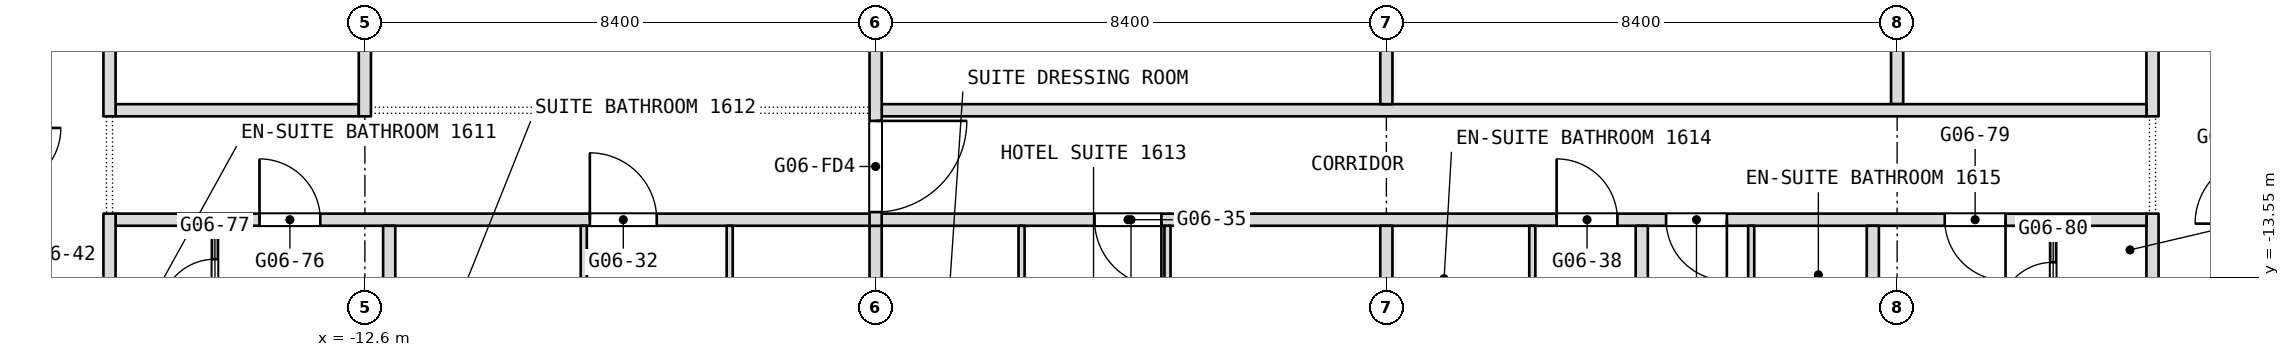
"""IFC4 building model, lengths in metres.
Left out: names, types, materials, properties, quantities, classifications, styles, units other than length and angle.
Written with IfcOpenShell. Run it as: python <this file> out.ifc"""

import sys

from ifc_helpers import new_model, si_unit, direction, frame, frame_2d, origin, place, context, subcontext, project, spatial, rectangle, extrude, element, fill, save


model = new_model("IFC4")
c1 = context("Model", 3, precision=1e-05, world=origin(), true_north=direction((0.0, 1.0)))
c2 = subcontext(c1, "Body", "Model", "MODEL_VIEW")
j1 = project(units=[si_unit("LENGTHUNIT", "METRE"), si_unit("PLANEANGLEUNIT", "RADIAN")], contexts=[c1])
p1 = place(None, origin())
s1 = spatial("IfcSite", under=j1, at=p1, CompositionType="ELEMENT")
p2 = place(p1, origin())
s2 = spatial("IfcBuilding", under=s1, at=p2, CompositionType="ELEMENT")
p3 = place(p2, frame((0.0, 0.0, 72.5)))
s3 = spatial("IfcBuildingStorey", under=s2, at=p3, CompositionType="ELEMENT", Elevation=72.5)
p4 = place(p3, frame((16.8, -17.143, 0.0), z_axis=(0.0, 0.0, 1.0), x_axis=(0.0, 1.0, 0.0)))
e1 = element("IfcWall", 1, at=p4, inside=s3, PredefinedType="PARTITIONING", context=c2, shape_type="SweptSolid", body=[
    extrude(rectangle(XDim=4.643, YDim=0.2, at=frame_2d((2.322, 0.0))), origin(), (0.0, 0.0, 1.0), 3.34),
])
p5 = place(p4, frame((0.772, 0.0, 0.0)))
e2 = element("IfcOpeningElement", 2, at=p5, cuts=e1, PredefinedType="OPENING", context=c2, shape_type="SweptSolid", body=[
    extrude(rectangle(XDim=0.9, YDim=2.1, at=frame_2d((0.45, 1.05))), frame((0.0, 0.1, 0.0), z_axis=(0.0, -1.0, 0.0), x_axis=(1.0, 0.0, 0.0)), (0.0, 0.0, 1.0), 0.2),
])
p6 = place(p3, frame((16.8, -10.9, 0.0), z_axis=(0.0, 0.0, 1.0), x_axis=(0.0, 1.0, 0.0)))
e3 = element("IfcWall", 3, at=p6, inside=s3, PredefinedType="PARTITIONING", context=c2, shape_type="SweptSolid", body=[
    extrude(rectangle(XDim=7.3, YDim=0.2, at=frame_2d((3.65, 0.0))), origin(), (0.0, 0.0, 1.0), 3.34),
])
p7 = place(p6, frame((3.15, 0.0, 0.0)))
e4 = element("IfcOpeningElement", 4, at=p7, cuts=e3, PredefinedType="OPENING", context=c2, shape_type="SweptSolid", body=[
    extrude(rectangle(XDim=1.0, YDim=2.1, at=frame_2d((0.5, 1.05))), frame((0.0, 0.1, 0.0), z_axis=(0.0, -1.0, 0.0), x_axis=(1.0, 0.0, 0.0)), (0.0, 0.0, 1.0), 0.2),
])
p8 = place(p3, frame((15.166, -15.0, 0.0), z_axis=(0.0, 0.0, 1.0), x_axis=(0.0, 1.0, 0.0)))
e5 = element("IfcWall", 5, at=p8, inside=s3, PredefinedType="PARTITIONING", context=c2, shape_type="SweptSolid", body=[
    extrude(rectangle(XDim=2.3, YDim=0.1, at=frame_2d((1.15, 0.0))), origin(), (0.0, 0.0, 1.0), 3.34),
])
p9 = place(p8, frame((0.8, 0.0, 0.0)))
e6 = element("IfcOpeningElement", 6, at=p9, cuts=e5, PredefinedType="OPENING", context=c2, shape_type="SweptSolid", body=[
    extrude(rectangle(XDim=0.9, YDim=2.1, at=frame_2d((0.45, 1.05))), frame((0.0, 0.05, 0.0), z_axis=(0.0, -1.0, 0.0), x_axis=(1.0, 0.0, 0.0)), (0.0, 0.0, 1.0), 0.1),
])
p10 = place(p3, frame((12.6, -10.7, 0.0), z_axis=(0.0, 0.0, 1.0), x_axis=(0.0, 1.0, 0.0)))
e7 = element("IfcWall", 7, at=p10, inside=s3, PredefinedType="PARTITIONING", context=c2, shape_type="SweptSolid", body=[
    extrude(rectangle(XDim=3.6, YDim=0.2, at=frame_2d((1.8, 0.0))), origin(), (0.0, 0.0, 1.0), 3.34),
])
p11 = place(p3, frame((-16.7, -12.6, 0.0), z_axis=(0.0, 0.0, 1.0), x_axis=(1.0, 0.0, 0.0)))
e8 = element("IfcWall", 8, at=p11, inside=s3, PredefinedType="PARTITIONING", context=c2, shape_type="SweptSolid", body=[
    extrude(rectangle(XDim=33.4, YDim=0.2, at=frame_2d((16.7, 0.0))), origin(), (0.0, 0.0, 1.0), 3.34),
])
p12 = place(p11, frame((7.8, 0.0, 0.0)))
e9 = element("IfcOpeningElement", 9, at=p12, cuts=e8, PredefinedType="OPENING", context=c2, shape_type="SweptSolid", body=[
    extrude(rectangle(XDim=1.1, YDim=2.1, at=frame_2d((0.55, 1.05))), frame((0.0, 0.1, 0.0), z_axis=(0.0, -1.0, 0.0), x_axis=(1.0, 0.0, 0.0)), (0.0, 0.0, 1.0), 0.2),
])
p13 = place(p11, frame((16.1, 0.0, 0.0)))
e10 = element("IfcOpeningElement", 10, at=p13, cuts=e8, PredefinedType="OPENING", context=c2, shape_type="SweptSolid", body=[
    extrude(rectangle(XDim=1.1, YDim=2.1, at=frame_2d((0.55, 1.05))), frame((0.0, 0.1, 0.0), z_axis=(0.0, -1.0, 0.0), x_axis=(1.0, 0.0, 0.0)), (0.0, 0.0, 1.0), 0.2),
])
p14 = place(p11, frame((23.7, 0.0, 0.0)))
e11 = element("IfcOpeningElement", 11, at=p14, cuts=e8, PredefinedType="OPENING", context=c2, shape_type="SweptSolid", body=[
    extrude(rectangle(XDim=1.0, YDim=2.1, at=frame_2d((0.5, 1.05))), frame((0.0, 0.1, 0.0), z_axis=(0.0, -1.0, 0.0), x_axis=(1.0, 0.0, 0.0)), (0.0, 0.0, 1.0), 0.2),
])
p15 = place(p11, frame((25.5, 0.0, 0.0)))
e12 = element("IfcOpeningElement", 12, at=p15, cuts=e8, PredefinedType="OPENING", context=c2, shape_type="SweptSolid", body=[
    extrude(rectangle(XDim=1.0, YDim=2.1, at=frame_2d((0.5, 1.05))), frame((0.0, 0.1, 0.0), z_axis=(0.0, -1.0, 0.0), x_axis=(1.0, 0.0, 0.0)), (0.0, 0.0, 1.0), 0.2),
])
p16 = place(p11, frame((2.367, 0.0, 0.0)))
e13 = element("IfcOpeningElement", 13, at=p16, cuts=e8, PredefinedType="OPENING", context=c2, shape_type="SweptSolid", body=[
    extrude(rectangle(XDim=1.0, YDim=2.1, at=frame_2d((0.5, 1.05))), frame((0.0, 0.1, 0.0), z_axis=(0.0, -1.0, 0.0), x_axis=(1.0, 0.0, 0.0)), (0.0, 0.0, 1.0), 0.2),
])
p17 = place(p11, frame((30.083, 0.0, 0.0)))
e14 = element("IfcOpeningElement", 14, at=p17, cuts=e8, PredefinedType="OPENING", context=c2, shape_type="SweptSolid", body=[
    extrude(rectangle(XDim=1.0, YDim=2.1, at=frame_2d((0.5, 1.05))), frame((0.0, 0.1, 0.0), z_axis=(0.0, -1.0, 0.0), x_axis=(1.0, 0.0, 0.0)), (0.0, 0.0, 1.0), 0.2),
])
p18 = place(p3, frame((12.2, -15.325, 0.0), z_axis=(0.0, 0.0, 1.0), x_axis=(0.0, 1.0, 0.0)))
e15 = element("IfcWall", 15, at=p18, inside=s3, PredefinedType="PARTITIONING", context=c2, shape_type="SweptSolid", body=[
    extrude(rectangle(XDim=2.625, YDim=0.2, at=frame_2d((1.312, 0.0))), origin(), (0.0, 0.0, 1.0), 3.34),
])
p19 = place(p3, frame((-16.7, -10.8, 0.0), z_axis=(0.0, 0.0, 1.0), x_axis=(1.0, 0.0, 0.0)))
e16 = element("IfcWall", 16, at=p19, inside=s3, PredefinedType="PARTITIONING", context=c2, shape_type="SweptSolid", body=[
    extrude(rectangle(XDim=4.0, YDim=0.2, at=frame_2d((2.0, 0.0))), origin(), (0.0, 0.0, 1.0), 3.34),
])
p20 = place(p3, frame((-4.1, -10.8, 0.0), z_axis=(0.0, 0.0, 1.0), x_axis=(1.0, 0.0, 0.0)))
e17 = element("IfcWall", 17, at=p20, inside=s3, PredefinedType="PARTITIONING", context=c2, shape_type="SweptSolid", body=[
    extrude(rectangle(XDim=20.8, YDim=0.2, at=frame_2d((10.4, 0.0))), origin(), (0.0, 0.0, 1.0), 3.34),
])
p21 = place(p3, frame((10.2, -15.425, 0.0), z_axis=(0.0, 0.0, 1.0), x_axis=(0.0, 1.0, 0.0)))
e18 = element("IfcWall", 18, at=p21, inside=s3, PredefinedType="PARTITIONING", context=c2, shape_type="SweptSolid", body=[
    extrude(rectangle(XDim=2.725, YDim=0.1, at=frame_2d((1.363, 0.0))), origin(), (0.0, 0.0, 1.0), 3.34),
])
p22 = place(p3, frame((8.4, -17.7, 0.0), z_axis=(0.0, 0.0, 1.0), x_axis=(0.0, 1.0, 0.0)))
e19 = element("IfcWall", 19, at=p22, inside=s3, PredefinedType="PARTITIONING", context=c2, shape_type="SweptSolid", body=[
    extrude(rectangle(XDim=5.0, YDim=0.2, at=frame_2d((2.5, 0.0))), origin(), (0.0, 0.0, 1.0), 3.34),
])
p23 = place(p3, frame((6.6, -15.325, 0.0), z_axis=(0.0, 0.0, 1.0), x_axis=(0.0, 1.0, 0.0)))
e20 = element("IfcWall", 20, at=p23, inside=s3, PredefinedType="PARTITIONING", context=c2, shape_type="SweptSolid", body=[
    extrude(rectangle(XDim=2.625, YDim=0.1, at=frame_2d((1.312, 0.0))), origin(), (0.0, 0.0, 1.0), 3.34),
])
p24 = place(p3, frame((4.2, -17.7, 0.0), z_axis=(0.0, 0.0, 1.0), x_axis=(0.0, 1.0, 0.0)))
e21 = element("IfcWall", 21, at=p24, inside=s3, PredefinedType="PARTITIONING", context=c2, shape_type="SweptSolid", body=[
    extrude(rectangle(XDim=5.0, YDim=0.2, at=frame_2d((2.5, 0.0))), origin(), (0.0, 0.0, 1.0), 3.34),
])
p25 = place(p3, frame((4.2, -10.7, 0.0), z_axis=(0.0, 0.0, 1.0), x_axis=(0.0, 1.0, 0.0)))
e22 = element("IfcWall", 22, at=p25, inside=s3, PredefinedType="PARTITIONING", context=c2, shape_type="SweptSolid", body=[
    extrude(rectangle(XDim=8.8, YDim=0.2, at=frame_2d((4.4, 0.0))), origin(), (0.0, 0.0, 1.0), 3.34),
])
p26 = place(p3, frame((0.6, -16.25, 0.0), z_axis=(0.0, 0.0, 1.0), x_axis=(0.0, 1.0, 0.0)))
e23 = element("IfcWall", 23, at=p26, inside=s3, PredefinedType="PARTITIONING", context=c2, shape_type="SweptSolid", body=[
    extrude(rectangle(XDim=3.55, YDim=0.1, at=frame_2d((1.775, 0.0))), origin(), (0.0, 0.0, 1.0), 3.34),
])
p27 = place(p3, frame((-1.8, -16.15, 0.0), z_axis=(0.0, 0.0, 1.0), x_axis=(0.0, 1.0, 0.0)))
e24 = element("IfcWall", 24, at=p27, inside=s3, PredefinedType="PARTITIONING", context=c2, shape_type="SweptSolid", body=[
    extrude(rectangle(XDim=3.45, YDim=0.1, at=frame_2d((1.725, 0.0))), origin(), (0.0, 0.0, 1.0), 3.34),
])
p28 = place(p3, frame((-4.2, -17.7, 0.0), z_axis=(0.0, 0.0, 1.0), x_axis=(0.0, 1.0, 0.0)))
e25 = element("IfcWall", 25, at=p28, inside=s3, PredefinedType="PARTITIONING", context=c2, shape_type="SweptSolid", body=[
    extrude(rectangle(XDim=5.0, YDim=0.2, at=frame_2d((2.5, 0.0))), origin(), (0.0, 0.0, 1.0), 3.34),
])
p29 = place(p3, frame((-4.2, -12.7, 0.0), z_axis=(0.0, 0.0, 1.0), x_axis=(0.0, 1.0, 0.0)))
e26 = element("IfcWall", 26, at=p29, inside=s3, PredefinedType="PARTITIONING", context=c2, shape_type="SweptSolid", body=[
    extrude(rectangle(XDim=12.7, YDim=0.2, at=frame_2d((6.35, 0.0))), origin(), (0.0, 0.0, 1.0), 3.34),
])
p30 = place(p29, frame((11.05, 0.0, 0.0)))
e27 = element("IfcOpeningElement", 27, at=p30, cuts=e26, PredefinedType="OPENING", context=c2, shape_type="SweptSolid", body=[
    extrude(rectangle(XDim=1.5, YDim=2.1, at=frame_2d((0.75, 1.05))), frame((0.0, 0.1, 0.0), z_axis=(0.0, -1.0, 0.0), x_axis=(1.0, 0.0, 0.0)), (0.0, 0.0, 1.0), 0.2),
])
p31 = place(p29, frame((0.225, 0.0, 0.0)))
e28 = element("IfcOpeningElement", 28, at=p31, cuts=e26, PredefinedType="OPENING", context=c2, shape_type="SweptSolid", body=[
    extrude(rectangle(XDim=1.5, YDim=2.1, at=frame_2d((0.75, 1.05))), frame((0.0, 0.1, 0.0), z_axis=(0.0, -1.0, 0.0), x_axis=(1.0, 0.0, 0.0)), (0.0, 0.0, 1.0), 0.2),
])
p32 = place(p3, frame((-6.6, -16.25, 0.0), z_axis=(0.0, 0.0, 1.0), x_axis=(0.0, 1.0, 0.0)))
e29 = element("IfcWall", 29, at=p32, inside=s3, PredefinedType="PARTITIONING", context=c2, shape_type="SweptSolid", body=[
    extrude(rectangle(XDim=3.55, YDim=0.1, at=frame_2d((1.775, 0.0))), origin(), (0.0, 0.0, 1.0), 3.34),
])
p33 = place(p3, frame((-9.0, -16.15, 0.0), z_axis=(0.0, 0.0, 1.0), x_axis=(0.0, 1.0, 0.0)))
e30 = element("IfcWall", 30, at=p33, inside=s3, PredefinedType="PARTITIONING", context=c2, shape_type="SweptSolid", body=[
    extrude(rectangle(XDim=3.45, YDim=0.1, at=frame_2d((1.725, 0.0))), origin(), (0.0, 0.0, 1.0), 3.34),
])
p34 = place(p33, frame((0.94, 0.0, 0.0)))
e31 = element("IfcOpeningElement", 31, at=p34, cuts=e30, PredefinedType="OPENING", context=c2, shape_type="SweptSolid", body=[
    extrude(rectangle(XDim=0.9, YDim=2.1, at=frame_2d((0.45, 1.05))), frame((0.0, 0.05, 0.0), z_axis=(0.0, -1.0, 0.0), x_axis=(1.0, 0.0, 0.0)), (0.0, 0.0, 1.0), 0.1),
])
p35 = place(p3, frame((-12.2, -16.0, 0.0), z_axis=(0.0, 0.0, 1.0), x_axis=(0.0, 1.0, 0.0)))
e32 = element("IfcWall", 32, at=p35, inside=s3, PredefinedType="PARTITIONING", context=c2, shape_type="SweptSolid", body=[
    extrude(rectangle(XDim=3.3, YDim=0.2, at=frame_2d((1.65, 0.0))), origin(), (0.0, 0.0, 1.0), 3.34),
])
p36 = place(p3, frame((-12.6, -10.9, 0.0), z_axis=(0.0, 0.0, 1.0), x_axis=(0.0, 1.0, 0.0)))
e33 = element("IfcWall", 33, at=p36, inside=s3, PredefinedType="PARTITIONING", context=c2, shape_type="SweptSolid", body=[
    extrude(rectangle(XDim=5.6, YDim=0.2, at=frame_2d((2.8, 0.0))), origin(), (0.0, 0.0, 1.0), 3.34),
])
p37 = place(p3, frame((-15.066, -14.9, 0.0), z_axis=(0.0, 0.0, 1.0), x_axis=(0.0, 1.0, 0.0)))
e34 = element("IfcWall", 34, at=p37, inside=s3, PredefinedType="PARTITIONING", context=c2, shape_type="SweptSolid", body=[
    extrude(rectangle(XDim=2.2, YDim=0.1, at=frame_2d((1.1, 0.0))), origin(), (0.0, 0.0, 1.0), 3.34),
])
p38 = place(p37, frame((0.75, 0.0, 0.0)))
e35 = element("IfcOpeningElement", 35, at=p38, cuts=e34, PredefinedType="OPENING", context=c2, shape_type="SweptSolid", body=[
    extrude(rectangle(XDim=0.9, YDim=2.1, at=frame_2d((0.45, 1.05))), frame((0.0, 0.05, 0.0), z_axis=(0.0, -1.0, 0.0), x_axis=(1.0, 0.0, 0.0)), (0.0, 0.0, 1.0), 0.1),
])
p39 = place(p3, frame((-16.8, -17.143, 0.0), z_axis=(0.0, 0.0, 1.0), x_axis=(0.0, 1.0, 0.0)))
e36 = element("IfcWall", 36, at=p39, inside=s3, PredefinedType="PARTITIONING", context=c2, shape_type="SweptSolid", body=[
    extrude(rectangle(XDim=4.643, YDim=0.2, at=frame_2d((2.322, 0.0))), origin(), (0.0, 0.0, 1.0), 3.34),
])
p40 = place(p39, frame((0.772, 0.0, 0.0)))
e37 = element("IfcOpeningElement", 37, at=p40, cuts=e36, PredefinedType="OPENING", context=c2, shape_type="SweptSolid", body=[
    extrude(rectangle(XDim=0.9, YDim=2.1, at=frame_2d((0.45, 1.05))), frame((0.0, 0.1, 0.0), z_axis=(0.0, -1.0, 0.0), x_axis=(1.0, 0.0, 0.0)), (0.0, 0.0, 1.0), 0.2),
])
p41 = place(p3, frame((-16.8, -10.9, 0.0), z_axis=(0.0, 0.0, 1.0), x_axis=(0.0, 1.0, 0.0)))
e38 = element("IfcWall", 38, at=p41, inside=s3, PredefinedType="PARTITIONING", context=c2, shape_type="SweptSolid", body=[
    extrude(rectangle(XDim=9.0, YDim=0.2, at=frame_2d((4.5, 0.0))), origin(), (0.0, 0.0, 1.0), 3.34),
])
p42 = place(p9, origin())
e39 = element("IfcDoor", 39, at=p42, inside=s3, OperationType="SINGLE_SWING_RIGHT", PredefinedType="DOOR", context=c2, shape_type="SweptSolid", body=[
    extrude(rectangle(XDim=0.9, YDim=2.1, at=frame_2d((0.45, 1.05))), frame((0.0, 0.025, 0.0), z_axis=(0.0, -1.0, 0.0), x_axis=(1.0, 0.0, 0.0)), (0.0, 0.0, 1.0), 0.05),
])
fill(e6, e39)
p43 = place(p12, origin())
e40 = element("IfcDoor", 40, at=p43, inside=s3, OperationType="SINGLE_SWING_RIGHT", PredefinedType="DOOR", context=c2, shape_type="SweptSolid", body=[
    extrude(rectangle(XDim=1.1, YDim=2.1, at=frame_2d((0.55, 1.05))), frame((0.0, 0.025, 0.0), z_axis=(0.0, -1.0, 0.0), x_axis=(1.0, 0.0, 0.0)), (0.0, 0.0, 1.0), 0.05),
])
fill(e9, e40)
p44 = place(p13, origin())
e41 = element("IfcDoor", 41, at=p44, inside=s3, OperationType="SINGLE_SWING_LEFT", PredefinedType="DOOR", context=c2, shape_type="SweptSolid", body=[
    extrude(rectangle(XDim=1.1, YDim=2.1, at=frame_2d((0.55, 1.05))), frame((0.0, 0.025, 0.0), z_axis=(0.0, -1.0, 0.0), x_axis=(1.0, 0.0, 0.0)), (0.0, 0.0, 1.0), 0.05),
])
fill(e10, e41)
p45 = place(p14, origin())
e42 = element("IfcDoor", 42, at=p45, inside=s3, OperationType="SINGLE_SWING_RIGHT", PredefinedType="DOOR", context=c2, shape_type="SweptSolid", body=[
    extrude(rectangle(XDim=1.0, YDim=2.1, at=frame_2d((0.5, 1.05))), frame((0.0, 0.025, 0.0), z_axis=(0.0, -1.0, 0.0), x_axis=(1.0, 0.0, 0.0)), (0.0, 0.0, 1.0), 0.05),
])
fill(e11, e42)
p46 = place(p15, origin())
e43 = element("IfcDoor", 43, at=p46, inside=s3, OperationType="SINGLE_SWING_RIGHT", PredefinedType="DOOR", context=c2, shape_type="SweptSolid", body=[
    extrude(rectangle(XDim=1.0, YDim=2.1, at=frame_2d((0.5, 1.05))), frame((0.0, 0.025, 0.0), z_axis=(0.0, -1.0, 0.0), x_axis=(1.0, 0.0, 0.0)), (0.0, 0.0, 1.0), 0.05),
])
fill(e12, e43)
p47 = place(p16, origin())
e44 = element("IfcDoor", 44, at=p47, inside=s3, OperationType="SINGLE_SWING_RIGHT", PredefinedType="DOOR", context=c2, shape_type="SweptSolid", body=[
    extrude(rectangle(XDim=1.0, YDim=2.1, at=frame_2d((0.5, 1.05))), frame((0.0, 0.025, 0.0), z_axis=(0.0, -1.0, 0.0), x_axis=(1.0, 0.0, 0.0)), (0.0, 0.0, 1.0), 0.05),
])
fill(e13, e44)
p48 = place(p17, origin())
e45 = element("IfcDoor", 45, at=p48, inside=s3, OperationType="SINGLE_SWING_LEFT", PredefinedType="DOOR", context=c2, shape_type="SweptSolid", body=[
    extrude(rectangle(XDim=1.0, YDim=2.1, at=frame_2d((0.5, 1.05))), frame((0.0, 0.025, 0.0), z_axis=(0.0, -1.0, 0.0), x_axis=(1.0, 0.0, 0.0)), (0.0, 0.0, 1.0), 0.05),
])
fill(e14, e45)
p49 = place(p38, origin())
e46 = element("IfcDoor", 46, at=p49, inside=s3, OperationType="SINGLE_SWING_RIGHT", PredefinedType="DOOR", context=c2, shape_type="SweptSolid", body=[
    extrude(rectangle(XDim=0.9, YDim=2.1, at=frame_2d((0.45, 1.05))), frame((0.0, 0.025, 0.0), z_axis=(0.0, -1.0, 0.0), x_axis=(1.0, 0.0, 0.0)), (0.0, 0.0, 1.0), 0.05),
])
fill(e35, e46)
p50 = place(p31, origin())
e47 = element("IfcDoor", 47, at=p50, inside=s3, OperationType="DOUBLE_DOOR_DOUBLE_SWING", PredefinedType="DOOR", context=c2, shape_type="SweptSolid", body=[
    extrude(rectangle(XDim=1.5, YDim=2.1, at=frame_2d((0.75, 1.05))), frame((0.0, 0.025, 0.0), z_axis=(0.0, -1.0, 0.0), x_axis=(1.0, 0.0, 0.0)), (0.0, 0.0, 1.0), 0.05),
])
fill(e28, e47)
save(model, sys.argv[1])
